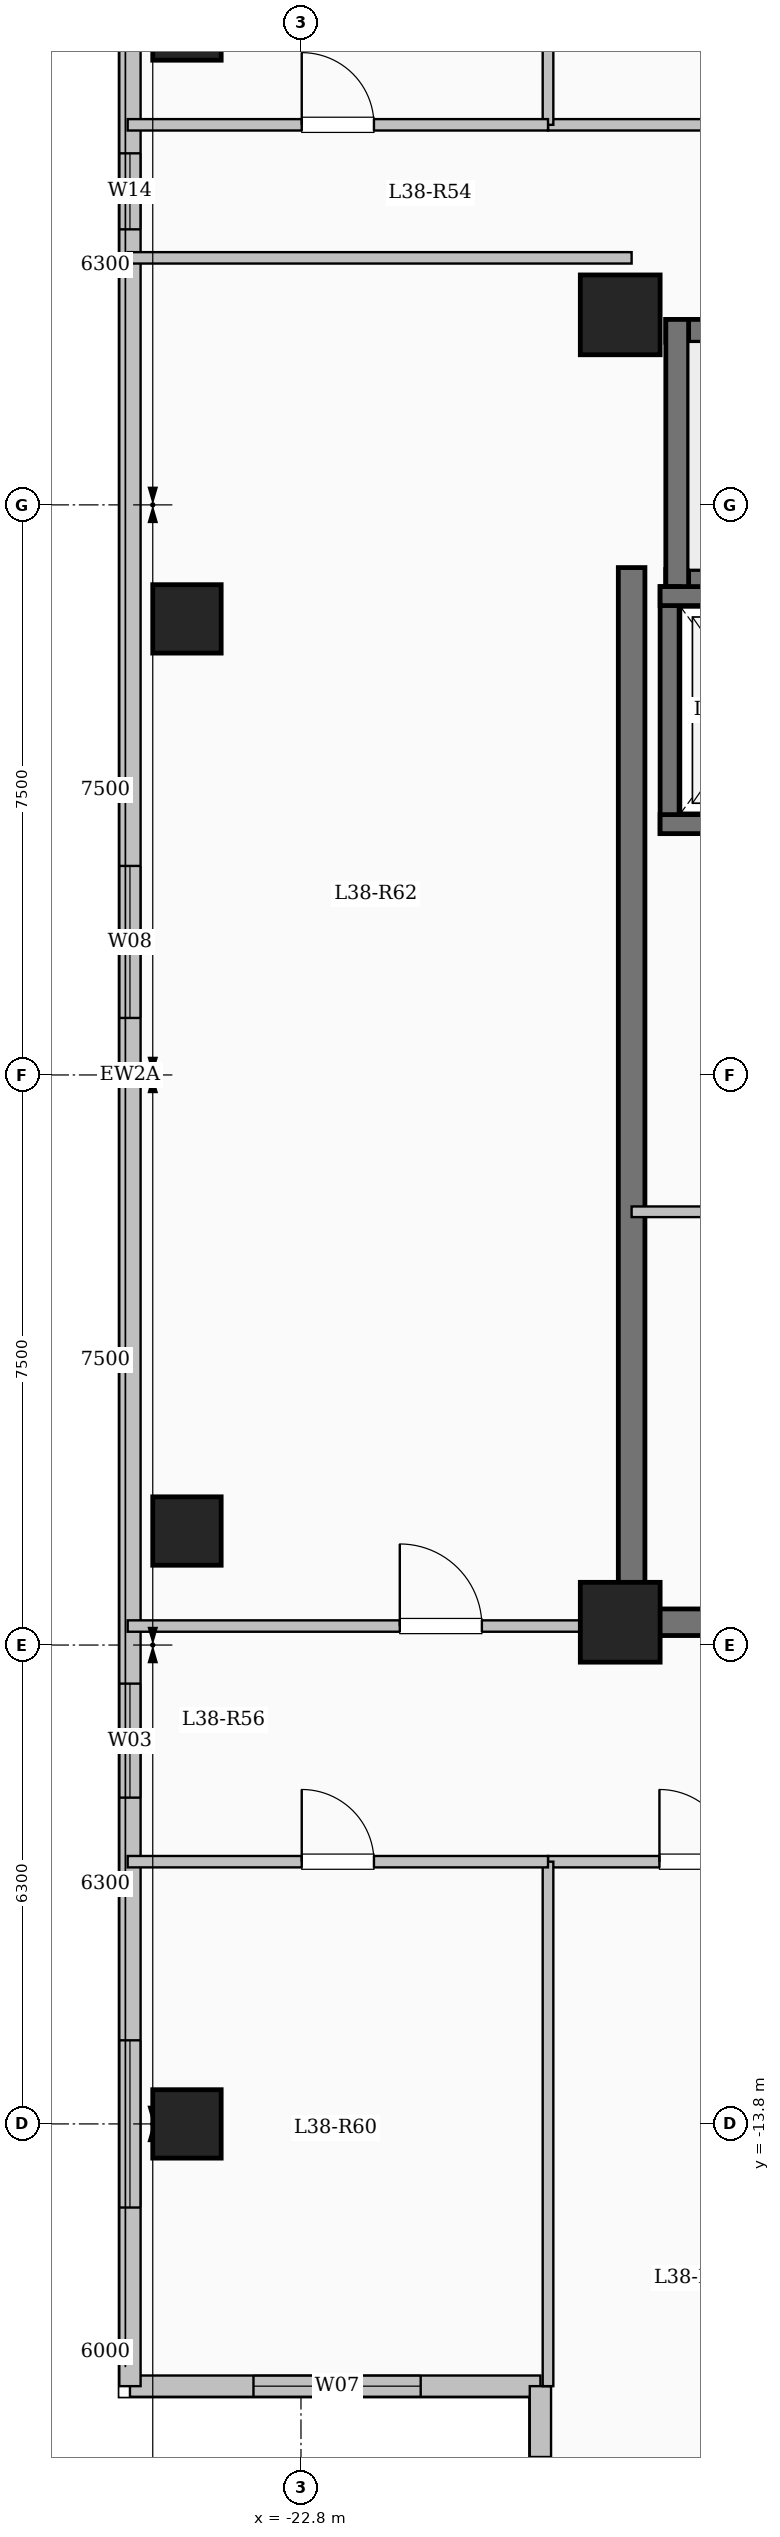
"""IFC4 building model, lengths in metres.
Left out: names, types, materials, properties, quantities, classifications, styles, units other than length and angle.
Written with IfcOpenShell. Run it as: python <this file> out.ifc"""

import sys

from ifc_helpers import new_model, si_unit, direction, frame, frame_2d, origin, origin_2d, place, context, subcontext, project, spatial, rectangle, extrude, element, fill, save


model = new_model("IFC4")
c1 = context("Model", 3, precision=1e-05, world=origin(), true_north=direction((0.0, 1.0)))
c2 = subcontext(c1, "Body", "Model", "MODEL_VIEW")
j1 = project(units=[si_unit("LENGTHUNIT", "METRE"), si_unit("PLANEANGLEUNIT", "RADIAN")], contexts=[c1])
p1 = place(None, origin())
s1 = spatial("IfcSite", under=j1, at=p1, CompositionType="ELEMENT")
p2 = place(p1, origin())
s2 = spatial("IfcBuilding", under=s1, at=p2, CompositionType="ELEMENT")
p3 = place(p2, frame((0.0, 0.0, 142.65)))
s3 = spatial("IfcBuildingStorey", under=s2, at=p3, CompositionType="ELEMENT", Elevation=142.65)
for number, where, z_axis, x_axis in (
    (1, (-18.6, -7.2, 0.0), (0.0, 0.0, 1.0), (1.0, 0.0, 0.0)),
    (2, (-18.6, 10.0, 0.0), (0.0, 0.0, 1.0), (1.0, 0.0, 0.0)),
):
    element("IfcColumn", number, at=place(p3, frame(where, z_axis=z_axis, x_axis=x_axis)), inside=s3, PredefinedType="COLUMN", context=c2, shape_type="SweptSolid", body=[
        extrude(rectangle(XDim=1.05, YDim=1.05, at=origin_2d()), origin(), (0.0, 0.0, 1.0), 3.35),
    ])
for number, where, z_axis, x_axis in (
    (3, (-24.3, -13.8, 0.0), (0.0, 0.0, 1.0), (1.0, 0.0, 0.0)),
    (4, (-24.3, -6.0, 0.0), (0.0, 0.0, 1.0), (1.0, 0.0, 0.0)),
    (5, (-24.3, 6.0, 0.0), (0.0, 0.0, 1.0), (1.0, 0.0, 0.0)),
    (6, (-24.3, 13.8, 0.0), (0.0, 0.0, 1.0), (1.0, 0.0, 0.0)),
):
    element("IfcColumn", number, at=place(p3, frame(where, z_axis=z_axis, x_axis=x_axis)), inside=s3, PredefinedType="COLUMN", context=c2, shape_type="SweptSolid", body=[
        extrude(rectangle(XDim=0.9, YDim=0.9, at=origin_2d()), origin(), (0.0, 0.0, 1.0), 3.35),
    ])
p4 = place(p3, frame((-19.65, -17.25, 0.0), z_axis=(0.0, 0.0, 1.0), x_axis=(-1.0, 0.0, 0.0)))
e7 = element("IfcWall", 7, at=p4, inside=s3, PredefinedType="SOLIDWALL", context=c2, shape_type="SweptSolid", body=[
    extrude(rectangle(XDim=5.4, YDim=0.28, at=frame_2d((2.7, 0.0))), origin(), (0.0, 0.0, 1.0), 3.1),
])
p5 = place(p4, frame((1.575, 0.0, 0.9)))
e8 = element("IfcOpeningElement", 8, at=p5, cuts=e7, PredefinedType="OPENING", context=c2, shape_type="SweptSolid", body=[
    extrude(rectangle(XDim=2.2, YDim=1.75, at=frame_2d((1.1, 0.875))), frame((0.0, 0.15, 0.0), z_axis=(0.0, -1.0, 0.0), x_axis=(1.0, 0.0, 0.0)), (0.0, 0.0, 1.0), 0.3),
])
p6 = place(p3, frame((-25.05, -17.25, 0.0), z_axis=(0.0, 0.0, 1.0), x_axis=(0.0, 1.0, 0.0)))
e9 = element("IfcWall", 9, at=p6, inside=s3, PredefinedType="SOLIDWALL", context=c2, shape_type="SweptSolid", body=[
    extrude(rectangle(XDim=34.5, YDim=0.28, at=frame_2d((17.25, 0.0))), origin(), (0.0, 0.0, 1.0), 3.1),
])
p7 = place(p6, frame((2.35, 0.0, 0.9)))
e10 = element("IfcOpeningElement", 10, at=p7, cuts=e9, PredefinedType="OPENING", context=c2, shape_type="SweptSolid", body=[
    extrude(rectangle(XDim=2.2, YDim=1.75, at=frame_2d((1.1, 0.875))), frame((0.0, 0.15, 0.0), z_axis=(0.0, -1.0, 0.0), x_axis=(1.0, 0.0, 0.0)), (0.0, 0.0, 1.0), 0.3),
])
p8 = place(p6, frame((7.742, 0.0, 0.9)))
e11 = element("IfcOpeningElement", 11, at=p8, cuts=e9, PredefinedType="OPENING", context=c2, shape_type="SweptSolid", body=[
    extrude(rectangle(XDim=1.5, YDim=1.65, at=frame_2d((0.75, 0.825))), frame((0.0, 0.15, 0.0), z_axis=(0.0, -1.0, 0.0), x_axis=(1.0, 0.0, 0.0)), (0.0, 0.0, 1.0), 0.3),
])
p9 = place(p6, frame((18.0, 0.0, 0.9)))
e12 = element("IfcOpeningElement", 12, at=p9, cuts=e9, PredefinedType="OPENING", context=c2, shape_type="SweptSolid", body=[
    extrude(rectangle(XDim=2.0, YDim=1.7, at=frame_2d((1.0, 0.85))), frame((0.0, 0.15, 0.0), z_axis=(0.0, -1.0, 0.0), x_axis=(1.0, 0.0, 0.0)), (0.0, 0.0, 1.0), 0.3),
])
p10 = place(p6, frame((28.375, 0.0, 0.95)))
e13 = element("IfcOpeningElement", 13, at=p10, cuts=e9, PredefinedType="OPENING", context=c2, shape_type="SweptSolid", body=[
    extrude(rectangle(XDim=1.0, YDim=1.5, at=frame_2d((0.5, 0.75))), frame((0.0, 0.15, 0.0), z_axis=(0.0, -1.0, 0.0), x_axis=(1.0, 0.0, 0.0)), (0.0, 0.0, 1.0), 0.3),
])
p11 = place(p6, frame((31.125, 0.0, 0.9)))
e14 = element("IfcOpeningElement", 14, at=p11, cuts=e9, PredefinedType="OPENING", context=c2, shape_type="SweptSolid", body=[
    extrude(rectangle(XDim=2.0, YDim=1.7, at=frame_2d((1.0, 0.85))), frame((0.0, 0.15, 0.0), z_axis=(0.0, -1.0, 0.0), x_axis=(1.0, 0.0, 0.0)), (0.0, 0.0, 1.0), 0.3),
])
p12 = place(p3, frame((-19.65, -21.15, 0.0), z_axis=(0.0, 0.0, 1.0), x_axis=(0.0, 1.0, 0.0)))
e15 = element("IfcWall", 15, at=p12, inside=s3, PredefinedType="SOLIDWALL", context=c2, shape_type="SweptSolid", body=[
    extrude(rectangle(XDim=3.9, YDim=0.28, at=frame_2d((1.95, 0.0))), origin(), (0.0, 0.0, 1.0), 3.1),
])
p13 = place(p12, frame((0.968, 0.0, 0.9)))
e16 = element("IfcOpeningElement", 16, at=p13, cuts=e15, PredefinedType="OPENING", context=c2, shape_type="SweptSolid", body=[
    extrude(rectangle(XDim=2.0, YDim=1.7, at=frame_2d((1.0, 0.85))), frame((0.0, 0.15, 0.0), z_axis=(0.0, -1.0, 0.0), x_axis=(1.0, 0.0, 0.0)), (0.0, 0.0, 1.0), 0.3),
])
p14 = place(p3, frame((-18.0, 9.79, 0.0), z_axis=(0.0, 0.0, 1.0), x_axis=(1.0, 0.0, 0.0)))
e17 = element("IfcWall", 17, at=p14, inside=s3, PredefinedType="SHEAR", context=c2, shape_type="SweptSolid", body=[
    extrude(rectangle(XDim=8.0, YDim=0.3, at=frame_2d((4.0, 0.0))), origin(), (0.0, 0.0, 1.0), 3.35),
])
p15 = place(p3, frame((-18.0, 6.5, 0.0), z_axis=(0.0, 0.0, 1.0), x_axis=(1.0, 0.0, 0.0)))
e18 = element("IfcWall", 18, at=p15, inside=s3, PredefinedType="SHEAR", context=c2, shape_type="SweptSolid", body=[
    extrude(rectangle(XDim=8.0, YDim=0.3, at=frame_2d((4.0, 0.0))), origin(), (0.0, 0.0, 1.0), 3.35),
])
p16 = place(p15, frame((6.45, 0.0, 0.0)))
e19 = element("IfcOpeningElement", 19, at=p16, cuts=e18, PredefinedType="OPENING", context=c2, shape_type="SweptSolid", body=[
    extrude(rectangle(XDim=1.0, YDim=2.15, at=frame_2d((0.5, 1.075))), frame((0.0, 0.16, 0.0), z_axis=(0.0, -1.0, 0.0), x_axis=(1.0, 0.0, 0.0)), (0.0, 0.0, 1.0), 0.32),
])
p17 = place(p3, frame((-17.85, 6.35, 0.0), z_axis=(0.0, 0.0, 1.0), x_axis=(0.0, 1.0, 0.0)))
e20 = element("IfcWall", 20, at=p17, inside=s3, PredefinedType="SHEAR", context=c2, shape_type="SweptSolid", body=[
    extrude(rectangle(XDim=3.59, YDim=0.3, at=frame_2d((1.795, 0.0))), origin(), (0.0, 0.0, 1.0), 3.35),
])
p18 = place(p3, frame((-17.95, 3.175, 0.0), z_axis=(0.0, 0.0, 1.0), x_axis=(0.0, 1.0, 0.0)))
e21 = element("IfcWall", 21, at=p18, inside=s3, PredefinedType="SHEAR", context=c2, shape_type="SweptSolid", body=[
    extrude(rectangle(XDim=3.25, YDim=0.25, at=frame_2d((1.625, 0.0))), origin(), (0.0, 0.0, 1.0), 3.35),
])
for number, where, z_axis, x_axis in (
    (22, (-18.075, 3.3, 0.0), (0.0, 0.0, 1.0), (1.0, 0.0, 0.0)),
    (23, (-18.075, 6.3, 0.0), (0.0, 0.0, 1.0), (1.0, 0.0, 0.0)),
):
    element("IfcWall", number, at=place(p3, frame(where, z_axis=z_axis, x_axis=x_axis)), inside=s3, PredefinedType="SHEAR", context=c2, shape_type="SweptSolid", body=[
        extrude(rectangle(XDim=2.55, YDim=0.25, at=frame_2d((1.275, 0.0))), origin(), (0.0, 0.0, 1.0), 3.35),
    ])
p19 = place(p3, frame((-18.45, -7.375, 0.0), z_axis=(0.0, 0.0, 1.0), x_axis=(0.0, 1.0, 0.0)))
e24 = element("IfcWall", 24, at=p19, inside=s3, PredefinedType="SHEAR", context=c2, shape_type="SweptSolid", body=[
    extrude(rectangle(XDim=14.05, YDim=0.35, at=frame_2d((7.025, 0.0))), origin(), (0.0, 0.0, 1.0), 3.35),
])
p20 = place(p3, frame((-18.625, -7.2, 0.0), z_axis=(0.0, 0.0, 1.0), x_axis=(1.0, 0.0, 0.0)))
e25 = element("IfcWall", 25, at=p20, inside=s3, PredefinedType="SHEAR", context=c2, shape_type="SweptSolid", body=[
    extrude(rectangle(XDim=8.55, YDim=0.35, at=frame_2d((4.275, 0.0))), origin(), (0.0, 0.0, 1.0), 3.35),
])
p21 = place(p3, frame((-18.45, -1.8, 0.0), z_axis=(0.0, 0.0, 1.0), x_axis=(1.0, 0.0, 0.0)))
e26 = element("IfcWall", 26, at=p21, inside=s3, PredefinedType="PARTITIONING", context=c2, shape_type="SweptSolid", body=[
    extrude(rectangle(XDim=3.05, YDim=0.14, at=frame_2d((1.525, 0.0))), origin(), (0.0, 0.0, 1.0), 3.1),
])
p22 = place(p21, frame((1.05, 0.0, 0.0)))
e27 = element("IfcOpeningElement", 27, at=p22, cuts=e26, PredefinedType="OPENING", context=c2, shape_type="SweptSolid", body=[
    extrude(rectangle(XDim=0.9, YDim=2.08, at=frame_2d((0.45, 1.04))), frame((0.0, 0.08, 0.0), z_axis=(0.0, -1.0, 0.0), x_axis=(1.0, 0.0, 0.0)), (0.0, 0.0, 1.0), 0.16),
])
p23 = place(p3, frame((-19.55, 12.5, 0.0), z_axis=(0.0, 0.0, 1.0), x_axis=(1.0, 0.0, 0.0)))
e28 = element("IfcWall", 28, at=p23, inside=s3, PredefinedType="PARTITIONING", context=c2, shape_type="SweptSolid", body=[
    extrude(rectangle(XDim=15.7, YDim=0.15, at=frame_2d((7.85, 0.0))), origin(), (0.0, 0.0, 1.0), 3.1),
])
p24 = place(p23, frame((2.292, 0.0, 0.0)))
e29 = element("IfcOpeningElement", 29, at=p24, cuts=e28, PredefinedType="OPENING", context=c2, shape_type="SweptSolid", body=[
    extrude(rectangle(XDim=0.95, YDim=2.15, at=frame_2d((0.475, 1.075))), frame((0.0, 0.085, 0.0), z_axis=(0.0, -1.0, 0.0), x_axis=(1.0, 0.0, 0.0)), (0.0, 0.0, 1.0), 0.17),
])
p25 = place(p23, frame((7.917, 0.0, 0.0)))
e30 = element("IfcOpeningElement", 30, at=p25, cuts=e28, PredefinedType="OPENING", context=c2, shape_type="SweptSolid", body=[
    extrude(rectangle(XDim=0.95, YDim=2.15, at=frame_2d((0.475, 1.075))), frame((0.0, 0.085, 0.0), z_axis=(0.0, -1.0, 0.0), x_axis=(1.0, 0.0, 0.0)), (0.0, 0.0, 1.0), 0.17),
])
p26 = place(p23, frame((12.92, 0.0, 0.0)))
e31 = element("IfcOpeningElement", 31, at=p26, cuts=e28, PredefinedType="OPENING", context=c2, shape_type="SweptSolid", body=[
    extrude(rectangle(XDim=0.95, YDim=2.15, at=frame_2d((0.475, 1.075))), frame((0.0, 0.085, 0.0), z_axis=(0.0, -1.0, 0.0), x_axis=(1.0, 0.0, 0.0)), (0.0, 0.0, 1.0), 0.17),
])
p27 = place(p3, frame((-19.55, -10.35, 0.0), z_axis=(0.0, 0.0, 1.0), x_axis=(1.0, 0.0, 0.0)))
e32 = element("IfcWall", 32, at=p27, inside=s3, PredefinedType="PARTITIONING", context=c2, shape_type="SweptSolid", body=[
    extrude(rectangle(XDim=11.0, YDim=0.15, at=frame_2d((5.5, 0.0))), origin(), (0.0, 0.0, 1.0), 3.1),
])
p28 = place(p27, frame((1.466, 0.0, 0.0)))
e33 = element("IfcOpeningElement", 33, at=p28, cuts=e32, PredefinedType="OPENING", context=c2, shape_type="SweptSolid", body=[
    extrude(rectangle(XDim=0.95, YDim=2.15, at=frame_2d((0.475, 1.075))), frame((0.0, 0.085, 0.0), z_axis=(0.0, -1.0, 0.0), x_axis=(1.0, 0.0, 0.0)), (0.0, 0.0, 1.0), 0.17),
])
p29 = place(p27, frame((5.438, 0.0, 0.0)))
e34 = element("IfcOpeningElement", 34, at=p29, cuts=e32, PredefinedType="OPENING", context=c2, shape_type="SweptSolid", body=[
    extrude(rectangle(XDim=0.95, YDim=2.15, at=frame_2d((0.475, 1.075))), frame((0.0, 0.085, 0.0), z_axis=(0.0, -1.0, 0.0), x_axis=(1.0, 0.0, 0.0)), (0.0, 0.0, 1.0), 0.17),
])
p30 = place(p27, frame((8.972, 0.0, 0.0)))
e35 = element("IfcOpeningElement", 35, at=p30, cuts=e32, PredefinedType="OPENING", context=c2, shape_type="SweptSolid", body=[
    extrude(rectangle(XDim=0.95, YDim=2.15, at=frame_2d((0.475, 1.075))), frame((0.0, 0.085, 0.0), z_axis=(0.0, -1.0, 0.0), x_axis=(1.0, 0.0, 0.0)), (0.0, 0.0, 1.0), 0.17),
])
p31 = place(p3, frame((-25.08, -7.25, 0.0), z_axis=(0.0, 0.0, 1.0), x_axis=(1.0, 0.0, 0.0)))
e36 = element("IfcWall", 36, at=p31, inside=s3, PredefinedType="PARTITIONING", context=c2, shape_type="SweptSolid", body=[
    extrude(rectangle(XDim=6.63, YDim=0.15, at=frame_2d((3.315, 0.0))), origin(), (0.0, 0.0, 1.0), 3.1),
])
p32 = place(p31, frame((3.58, 0.0, 0.0)))
e37 = element("IfcOpeningElement", 37, at=p32, cuts=e36, PredefinedType="OPENING", context=c2, shape_type="SweptSolid", body=[
    extrude(rectangle(XDim=1.08, YDim=2.15, at=frame_2d((0.54, 1.075))), frame((0.0, 0.085, 0.0), z_axis=(0.0, -1.0, 0.0), x_axis=(1.0, 0.0, 0.0)), (0.0, 0.0, 1.0), 0.17),
])
p33 = place(p3, frame((-25.08, 10.75, 0.0), z_axis=(0.0, 0.0, 1.0), x_axis=(1.0, 0.0, 0.0)))
e38 = element("IfcWall", 38, at=p33, inside=s3, PredefinedType="PARTITIONING", context=c2, shape_type="SweptSolid", body=[
    extrude(rectangle(XDim=6.63, YDim=0.15, at=frame_2d((3.315, 0.0))), origin(), (0.0, 0.0, 1.0), 3.1),
])
p34 = place(p3, frame((-19.55, -17.25, 0.0), z_axis=(0.0, 0.0, 1.0), x_axis=(0.0, 1.0, 0.0)))
e39 = element("IfcWall", 39, at=p34, inside=s3, PredefinedType="PARTITIONING", context=c2, shape_type="SweptSolid", body=[
    extrude(rectangle(XDim=6.9, YDim=0.14, at=frame_2d((3.45, 0.0))), origin(), (0.0, 0.0, 1.0), 3.1),
])
p35 = place(p3, frame((-19.55, 12.5, 0.0), z_axis=(0.0, 0.0, 1.0), x_axis=(0.0, 1.0, 0.0)))
e40 = element("IfcWall", 40, at=p35, inside=s3, PredefinedType="PARTITIONING", context=c2, shape_type="SweptSolid", body=[
    extrude(rectangle(XDim=4.75, YDim=0.14, at=frame_2d((2.375, 0.0))), origin(), (0.0, 0.0, 1.0), 3.1),
])
p36 = place(p3, frame((-25.08, 12.5, 0.0), z_axis=(0.0, 0.0, 1.0), x_axis=(1.0, 0.0, 0.0)))
e41 = element("IfcWall", 41, at=p36, inside=s3, PredefinedType="PARTITIONING", context=c2, shape_type="SweptSolid", body=[
    extrude(rectangle(XDim=5.53, YDim=0.15, at=frame_2d((2.765, 0.0))), origin(), (0.0, 0.0, 1.0), 3.1),
])
p37 = place(p36, frame((2.29, 0.0, 0.0)))
e42 = element("IfcOpeningElement", 42, at=p37, cuts=e41, PredefinedType="OPENING", context=c2, shape_type="SweptSolid", body=[
    extrude(rectangle(XDim=0.95, YDim=2.15, at=frame_2d((0.475, 1.075))), frame((0.0, 0.085, 0.0), z_axis=(0.0, -1.0, 0.0), x_axis=(1.0, 0.0, 0.0)), (0.0, 0.0, 1.0), 0.17),
])
p38 = place(p3, frame((-25.08, -10.35, 0.0), z_axis=(0.0, 0.0, 1.0), x_axis=(1.0, 0.0, 0.0)))
e43 = element("IfcWall", 43, at=p38, inside=s3, PredefinedType="PARTITIONING", context=c2, shape_type="SweptSolid", body=[
    extrude(rectangle(XDim=5.53, YDim=0.15, at=frame_2d((2.765, 0.0))), origin(), (0.0, 0.0, 1.0), 3.1),
])
p39 = place(p38, frame((2.29, 0.0, 0.0)))
e44 = element("IfcOpeningElement", 44, at=p39, cuts=e43, PredefinedType="OPENING", context=c2, shape_type="SweptSolid", body=[
    extrude(rectangle(XDim=0.95, YDim=2.15, at=frame_2d((0.475, 1.075))), frame((0.0, 0.085, 0.0), z_axis=(0.0, -1.0, 0.0), x_axis=(1.0, 0.0, 0.0)), (0.0, 0.0, 1.0), 0.17),
])
p40 = place(p5, origin())
e45 = element("IfcWindow", 45, at=p40, inside=s3, PartitioningType="SINGLE_PANEL", PredefinedType="WINDOW", context=c2, shape_type="SweptSolid", body=[
    extrude(rectangle(XDim=2.2, YDim=1.75, at=frame_2d((1.1, 0.875))), frame((0.0, 0.03, 0.0), z_axis=(0.0, -1.0, 0.0), x_axis=(1.0, 0.0, 0.0)), (0.0, 0.0, 1.0), 0.06),
])
fill(e8, e45)
p41 = place(p7, origin())
e46 = element("IfcWindow", 46, at=p41, inside=s3, PartitioningType="SINGLE_PANEL", PredefinedType="WINDOW", context=c2, shape_type="SweptSolid", body=[
    extrude(rectangle(XDim=2.2, YDim=1.75, at=frame_2d((1.1, 0.875))), frame((0.0, 0.03, 0.0), z_axis=(0.0, -1.0, 0.0), x_axis=(1.0, 0.0, 0.0)), (0.0, 0.0, 1.0), 0.06),
])
fill(e10, e46)
p42 = place(p8, origin())
e47 = element("IfcWindow", 47, at=p42, inside=s3, PartitioningType="SINGLE_PANEL", PredefinedType="WINDOW", context=c2, shape_type="SweptSolid", body=[
    extrude(rectangle(XDim=1.5, YDim=1.65, at=frame_2d((0.75, 0.825))), frame((0.0, 0.03, 0.0), z_axis=(0.0, -1.0, 0.0), x_axis=(1.0, 0.0, 0.0)), (0.0, 0.0, 1.0), 0.06),
])
fill(e11, e47)
p43 = place(p9, origin())
e48 = element("IfcWindow", 48, at=p43, inside=s3, PartitioningType="SINGLE_PANEL", PredefinedType="WINDOW", context=c2, shape_type="SweptSolid", body=[
    extrude(rectangle(XDim=2.0, YDim=1.7, at=frame_2d((1.0, 0.85))), frame((0.0, 0.03, 0.0), z_axis=(0.0, -1.0, 0.0), x_axis=(1.0, 0.0, 0.0)), (0.0, 0.0, 1.0), 0.06),
])
fill(e12, e48)
p44 = place(p10, origin())
e49 = element("IfcWindow", 49, at=p44, inside=s3, PartitioningType="SINGLE_PANEL", PredefinedType="WINDOW", context=c2, shape_type="SweptSolid", body=[
    extrude(rectangle(XDim=1.0, YDim=1.5, at=frame_2d((0.5, 0.75))), frame((0.0, 0.03, 0.0), z_axis=(0.0, -1.0, 0.0), x_axis=(1.0, 0.0, 0.0)), (0.0, 0.0, 1.0), 0.06),
])
fill(e13, e49)
p45 = place(p13, origin())
e50 = element("IfcWindow", 50, at=p45, inside=s3, PartitioningType="SINGLE_PANEL", PredefinedType="WINDOW", context=c2, shape_type="SweptSolid", body=[
    extrude(rectangle(XDim=2.0, YDim=1.7, at=frame_2d((1.0, 0.85))), frame((0.0, 0.03, 0.0), z_axis=(0.0, -1.0, 0.0), x_axis=(1.0, 0.0, 0.0)), (0.0, 0.0, 1.0), 0.06),
])
fill(e16, e50)
p46 = place(p28, origin())
e51 = element("IfcDoor", 51, at=p46, inside=s3, OperationType="SINGLE_SWING_LEFT", PredefinedType="DOOR", context=c2, shape_type="SweptSolid", body=[
    extrude(rectangle(XDim=0.95, YDim=2.15, at=frame_2d((0.475, 1.075))), frame((0.0, 0.025, 0.0), z_axis=(0.0, -1.0, 0.0), x_axis=(1.0, 0.0, 0.0)), (0.0, 0.0, 1.0), 0.05),
])
fill(e33, e51)
p47 = place(p37, origin())
e52 = element("IfcDoor", 52, at=p47, inside=s3, OperationType="SINGLE_SWING_LEFT", PredefinedType="DOOR", context=c2, shape_type="SweptSolid", body=[
    extrude(rectangle(XDim=0.95, YDim=2.15, at=frame_2d((0.475, 1.075))), frame((0.0, 0.025, 0.0), z_axis=(0.0, -1.0, 0.0), x_axis=(1.0, 0.0, 0.0)), (0.0, 0.0, 1.0), 0.05),
])
fill(e42, e52)
p48 = place(p39, origin())
e53 = element("IfcDoor", 53, at=p48, inside=s3, OperationType="SINGLE_SWING_LEFT", PredefinedType="DOOR", context=c2, shape_type="SweptSolid", body=[
    extrude(rectangle(XDim=0.95, YDim=2.15, at=frame_2d((0.475, 1.075))), frame((0.0, 0.025, 0.0), z_axis=(0.0, -1.0, 0.0), x_axis=(1.0, 0.0, 0.0)), (0.0, 0.0, 1.0), 0.05),
])
fill(e44, e53)
p49 = place(p32, origin())
e54 = element("IfcDoor", 54, at=p49, inside=s3, OperationType="SINGLE_SWING_LEFT", PredefinedType="DOOR", context=c2, shape_type="SweptSolid", body=[
    extrude(rectangle(XDim=1.08, YDim=2.15, at=frame_2d((0.54, 1.075))), frame((0.0, 0.025, 0.0), z_axis=(0.0, -1.0, 0.0), x_axis=(1.0, 0.0, 0.0)), (0.0, 0.0, 1.0), 0.05),
])
fill(e37, e54)
save(model, sys.argv[1])
